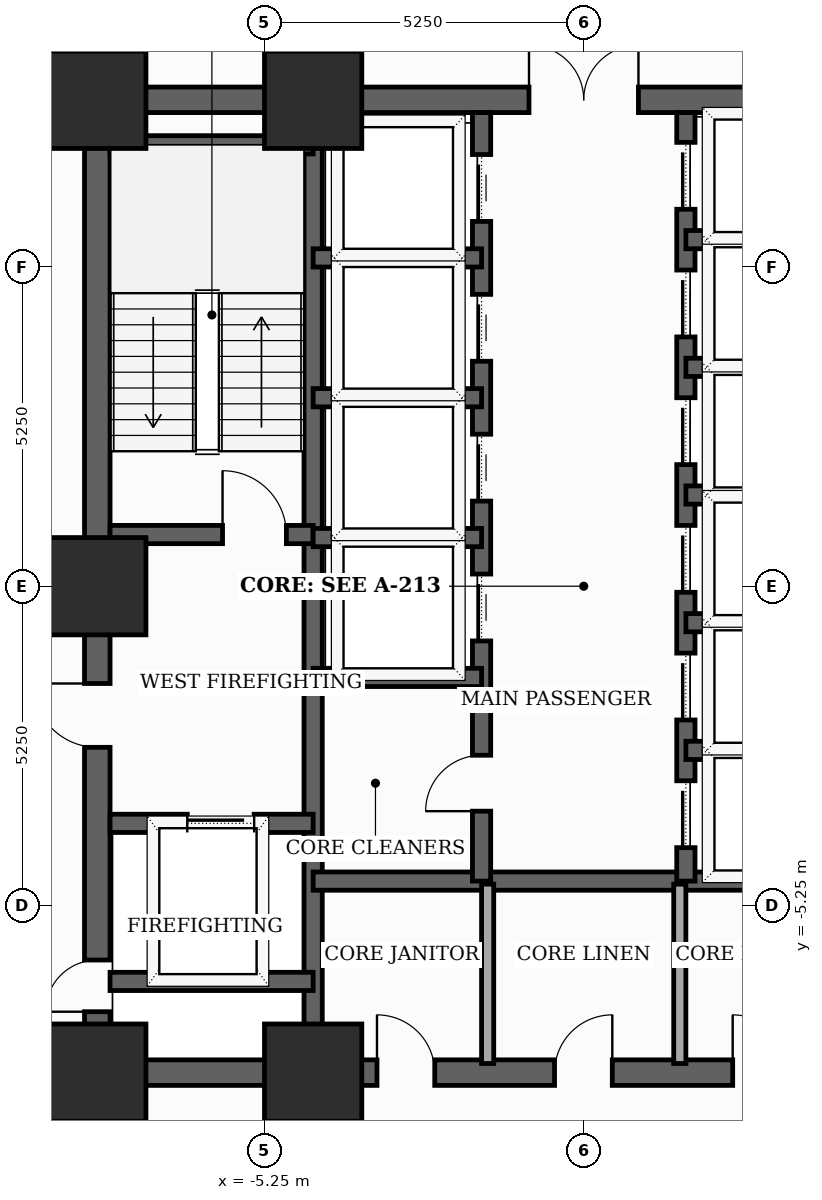
"""IFC4 building model, lengths in metres.
Left out: names, types, materials, properties, quantities, classifications, styles, units other than length and angle.
Written with IfcOpenShell. Run it as: python <this file> out.ifc"""

import sys

from ifc_helpers import new_model, si_unit, direction, frame, frame_2d, origin, origin_2d, place, context, subcontext, project, spatial, rectangle, extrude, element, fill, save


model = new_model("IFC4")
c1 = context("Model", 3, precision=1e-05, world=origin(), true_north=direction((0.0, 1.0)))
c2 = subcontext(c1, "Body", "Model", "MODEL_VIEW")
j1 = project(units=[si_unit("LENGTHUNIT", "METRE"), si_unit("PLANEANGLEUNIT", "RADIAN")], contexts=[c1])
p1 = place(None, origin())
s1 = spatial("IfcSite", under=j1, at=p1, CompositionType="ELEMENT")
p2 = place(p1, origin())
s2 = spatial("IfcBuilding", under=s1, at=p2, CompositionType="ELEMENT")
p3 = place(p2, frame((0.0, 0.0, 44.5)))
s3 = spatial("IfcBuildingStorey", under=s2, at=p3, CompositionType="ELEMENT", Elevation=44.5)
for number, where, z_axis, x_axis in (
    (1, (-8.0, -8.0, 0.0), (0.0, 0.0, 1.0), (1.0, 0.0, 0.0)),
    (2, (-4.45, -8.0, 0.0), (0.0, 0.0, 1.0), (1.0, 0.0, 0.0)),
    (3, (-4.45, 8.0, 0.0), (0.0, 0.0, 1.0), (1.0, 0.0, 0.0)),
    (4, (-8.0, 8.0, 0.0), (0.0, 0.0, 1.0), (1.0, 0.0, 0.0)),
    (5, (-8.0, 0.0, 0.0), (0.0, 0.0, 1.0), (1.0, 0.0, 0.0)),
):
    element("IfcColumn", number, at=place(p3, frame(where, z_axis=z_axis, x_axis=x_axis)), inside=s3, PredefinedType="COLUMN", context=c2, shape_type="SweptSolid", body=[
        extrude(rectangle(XDim=1.6, YDim=1.6, at=origin_2d()), origin(), (0.0, 0.0, 1.0), 3.7),
    ])
p4 = place(p3, frame((-8.0, -8.0, 0.0), z_axis=(0.0, 0.0, 1.0), x_axis=(0.0, 1.0, 0.0)))
e6 = element("IfcWall", 6, at=p4, inside=s3, PredefinedType="SHEAR", context=c2, shape_type="SweptSolid", body=[
    extrude(rectangle(XDim=16.0, YDim=0.42, at=frame_2d((8.0, 0.0))), origin(), (0.0, 0.0, 1.0), 3.5),
])
p5 = place(p4, frame((1.002, 0.0, 0.0)))
e7 = element("IfcOpeningElement", 7, at=p5, cuts=e6, PredefinedType="OPENING", context=c2, shape_type="SweptSolid", body=[
    extrude(rectangle(XDim=0.85, YDim=2.02, at=frame_2d((0.425, 1.01))), frame((0.0, 0.22, 0.0), z_axis=(0.0, -1.0, 0.0), x_axis=(1.0, 0.0, 0.0)), (0.0, 0.0, 1.0), 0.44),
])
p6 = place(p4, frame((5.35, 0.0, 0.0)))
e8 = element("IfcOpeningElement", 8, at=p6, cuts=e6, PredefinedType="OPENING", context=c2, shape_type="SweptSolid", body=[
    extrude(rectangle(XDim=1.05, YDim=2.15, at=frame_2d((0.525, 1.075))), frame((0.0, 0.22, 0.0), z_axis=(0.0, -1.0, 0.0), x_axis=(1.0, 0.0, 0.0)), (0.0, 0.0, 1.0), 0.44),
])
p7 = place(p3, frame((-8.0, -8.0, 0.0), z_axis=(0.0, 0.0, 1.0), x_axis=(1.0, 0.0, 0.0)))
e9 = element("IfcWall", 9, at=p7, inside=s3, PredefinedType="SHEAR", context=c2, shape_type="SweptSolid", body=[
    extrude(rectangle(XDim=16.0, YDim=0.42, at=frame_2d((8.0, 0.0))), origin(), (0.0, 0.0, 1.0), 3.5),
])
p8 = place(p7, frame((4.6, 0.0, 0.0)))
e10 = element("IfcOpeningElement", 10, at=p8, cuts=e9, PredefinedType="OPENING", context=c2, shape_type="SweptSolid", body=[
    extrude(rectangle(XDim=0.95, YDim=2.1, at=frame_2d((0.475, 1.05))), frame((0.0, 0.22, 0.0), z_axis=(0.0, -1.0, 0.0), x_axis=(1.0, 0.0, 0.0)), (0.0, 0.0, 1.0), 0.44),
])
p9 = place(p7, frame((7.52, 0.0, 0.0)))
e11 = element("IfcOpeningElement", 11, at=p9, cuts=e9, PredefinedType="OPENING", context=c2, shape_type="SweptSolid", body=[
    extrude(rectangle(XDim=0.95, YDim=2.1, at=frame_2d((0.475, 1.05))), frame((0.0, 0.22, 0.0), z_axis=(0.0, -1.0, 0.0), x_axis=(1.0, 0.0, 0.0)), (0.0, 0.0, 1.0), 0.44),
])
p10 = place(p7, frame((10.45, 0.0, 0.0)))
e12 = element("IfcOpeningElement", 12, at=p10, cuts=e9, PredefinedType="OPENING", context=c2, shape_type="SweptSolid", body=[
    extrude(rectangle(XDim=0.95, YDim=2.1, at=frame_2d((0.475, 1.05))), frame((0.0, 0.22, 0.0), z_axis=(0.0, -1.0, 0.0), x_axis=(1.0, 0.0, 0.0)), (0.0, 0.0, 1.0), 0.44),
])
p11 = place(p3, frame((-8.0, 8.0, 0.0), z_axis=(0.0, 0.0, 1.0), x_axis=(1.0, 0.0, 0.0)))
e13 = element("IfcWall", 13, at=p11, inside=s3, PredefinedType="SHEAR", context=c2, shape_type="SweptSolid", body=[
    extrude(rectangle(XDim=16.0, YDim=0.42, at=frame_2d((8.0, 0.0))), origin(), (0.0, 0.0, 1.0), 3.5),
])
p12 = place(p11, frame((7.1, 0.0, 0.0)))
e14 = element("IfcOpeningElement", 14, at=p12, cuts=e13, PredefinedType="OPENING", context=c2, shape_type="SweptSolid", body=[
    extrude(rectangle(XDim=1.8, YDim=2.15, at=frame_2d((0.9, 1.075))), frame((0.0, 0.22, 0.0), z_axis=(0.0, -1.0, 0.0), x_axis=(1.0, 0.0, 0.0)), (0.0, 0.0, 1.0), 0.44),
])
p13 = place(p3, frame((-4.45, -7.79, 0.0), z_axis=(0.0, 0.0, 1.0), x_axis=(0.0, 1.0, 0.0)))
e15 = element("IfcWall", 15, at=p13, inside=s3, PredefinedType="SHEAR", context=c2, shape_type="SweptSolid", body=[
    extrude(rectangle(XDim=15.58, YDim=0.3, at=frame_2d((7.79, 0.0))), origin(), (0.0, 0.0, 1.0), 3.5),
])
p14 = place(p3, frame((-7.79, 0.85, 0.0), z_axis=(0.0, 0.0, 1.0), x_axis=(1.0, 0.0, 0.0)))
e16 = element("IfcWall", 16, at=p14, inside=s3, PredefinedType="SHEAR", context=c2, shape_type="SweptSolid", body=[
    extrude(rectangle(XDim=3.34, YDim=0.3, at=frame_2d((1.67, 0.0))), origin(), (0.0, 0.0, 1.0), 3.5),
])
p15 = place(p14, frame((1.85, 0.0, 0.0)))
e17 = element("IfcOpeningElement", 17, at=p15, cuts=e16, PredefinedType="OPENING", context=c2, shape_type="SweptSolid", body=[
    extrude(rectangle(XDim=1.05, YDim=2.15, at=frame_2d((0.525, 1.075))), frame((0.0, 0.16, 0.0), z_axis=(0.0, -1.0, 0.0), x_axis=(1.0, 0.0, 0.0)), (0.0, 0.0, 1.0), 0.32),
])
p16 = place(p3, frame((-7.79, 7.26, 0.0), z_axis=(0.0, 0.0, 1.0), x_axis=(1.0, 0.0, 0.0)))
e18 = element("IfcWall", 18, at=p16, inside=s3, PredefinedType="SHEAR", context=c2, shape_type="SweptSolid", body=[
    extrude(rectangle(XDim=3.34, YDim=0.3, at=frame_2d((1.67, 0.0))), origin(), (0.0, 0.0, 1.0), 3.5),
])
p17 = place(p3, frame((-7.79, -3.9, 0.0), z_axis=(0.0, 0.0, 1.0), x_axis=(1.0, 0.0, 0.0)))
e19 = element("IfcWall", 19, at=p17, inside=s3, PredefinedType="SHEAR", context=c2, shape_type="SweptSolid", body=[
    extrude(rectangle(XDim=3.34, YDim=0.3, at=frame_2d((1.67, 0.0))), origin(), (0.0, 0.0, 1.0), 3.5),
])
p18 = place(p17, frame((1.27, 0.0, 0.0)))
e20 = element("IfcOpeningElement", 20, at=p18, cuts=e19, PredefinedType="OPENING", context=c2, shape_type="SweptSolid", body=[
    extrude(rectangle(XDim=1.1, YDim=2.1, at=frame_2d((0.55, 1.05))), frame((0.0, 0.16, 0.0), z_axis=(0.0, -1.0, 0.0), x_axis=(1.0, 0.0, 0.0)), (0.0, 0.0, 1.0), 0.32),
])
p19 = place(p3, frame((-7.79, -6.5, 0.0), z_axis=(0.0, 0.0, 1.0), x_axis=(1.0, 0.0, 0.0)))
e21 = element("IfcWall", 21, at=p19, inside=s3, PredefinedType="SHEAR", context=c2, shape_type="SweptSolid", body=[
    extrude(rectangle(XDim=3.34, YDim=0.3, at=frame_2d((1.67, 0.0))), origin(), (0.0, 0.0, 1.0), 3.5),
])
p20 = place(p3, frame((-4.45, -4.85, 0.0), z_axis=(0.0, 0.0, 1.0), x_axis=(1.0, 0.0, 0.0)))
e22 = element("IfcWall", 22, at=p20, inside=s3, PredefinedType="SHEAR", context=c2, shape_type="SweptSolid", body=[
    extrude(rectangle(XDim=8.9, YDim=0.3, at=frame_2d((4.45, 0.0))), origin(), (0.0, 0.0, 1.0), 3.5),
])
p21 = place(p3, frame((-1.68, -4.85, 0.0), z_axis=(0.0, 0.0, 1.0), x_axis=(0.0, 1.0, 0.0)))
e23 = element("IfcWall", 23, at=p21, inside=s3, PredefinedType="SHEAR", context=c2, shape_type="SweptSolid", body=[
    extrude(rectangle(XDim=12.64, YDim=0.3, at=frame_2d((6.32, 0.0))), origin(), (0.0, 0.0, 1.0), 3.5),
])
p22 = place(p21, frame((3.95, 0.0, 0.0)))
e24 = element("IfcOpeningElement", 24, at=p22, cuts=e23, PredefinedType="OPENING", context=c2, shape_type="SweptSolid", body=[
    extrude(rectangle(XDim=1.1, YDim=2.1, at=frame_2d((0.55, 1.05))), frame((0.0, 0.16, 0.0), z_axis=(0.0, -1.0, 0.0), x_axis=(1.0, 0.0, 0.0)), (0.0, 0.0, 1.0), 0.32),
])
p23 = place(p21, frame((6.25, 0.0, 0.0)))
e25 = element("IfcOpeningElement", 25, at=p23, cuts=e23, PredefinedType="OPENING", context=c2, shape_type="SweptSolid", body=[
    extrude(rectangle(XDim=1.1, YDim=2.1, at=frame_2d((0.55, 1.05))), frame((0.0, 0.16, 0.0), z_axis=(0.0, -1.0, 0.0), x_axis=(1.0, 0.0, 0.0)), (0.0, 0.0, 1.0), 0.32),
])
p24 = place(p21, frame((8.55, 0.0, 0.0)))
e26 = element("IfcOpeningElement", 26, at=p24, cuts=e23, PredefinedType="OPENING", context=c2, shape_type="SweptSolid", body=[
    extrude(rectangle(XDim=1.1, YDim=2.1, at=frame_2d((0.55, 1.05))), frame((0.0, 0.16, 0.0), z_axis=(0.0, -1.0, 0.0), x_axis=(1.0, 0.0, 0.0)), (0.0, 0.0, 1.0), 0.32),
])
p25 = place(p21, frame((10.85, 0.0, 0.0)))
e27 = element("IfcOpeningElement", 27, at=p25, cuts=e23, PredefinedType="OPENING", context=c2, shape_type="SweptSolid", body=[
    extrude(rectangle(XDim=1.1, YDim=2.1, at=frame_2d((0.55, 1.05))), frame((0.0, 0.16, 0.0), z_axis=(0.0, -1.0, 0.0), x_axis=(1.0, 0.0, 0.0)), (0.0, 0.0, 1.0), 0.32),
])
p26 = place(p21, frame((1.15, 0.0, 0.0)))
e28 = element("IfcOpeningElement", 28, at=p26, cuts=e23, PredefinedType="OPENING", context=c2, shape_type="SweptSolid", body=[
    extrude(rectangle(XDim=0.92, YDim=2.1, at=frame_2d((0.46, 1.05))), frame((0.0, 0.16, 0.0), z_axis=(0.0, -1.0, 0.0), x_axis=(1.0, 0.0, 0.0)), (0.0, 0.0, 1.0), 0.32),
])
p27 = place(p3, frame((1.68, -4.85, 0.0), z_axis=(0.0, 0.0, 1.0), x_axis=(0.0, 1.0, 0.0)))
e29 = element("IfcWall", 29, at=p27, inside=s3, PredefinedType="SHEAR", context=c2, shape_type="SweptSolid", body=[
    extrude(rectangle(XDim=12.64, YDim=0.3, at=frame_2d((6.32, 0.0))), origin(), (0.0, 0.0, 1.0), 3.5),
])
p28 = place(p27, frame((0.55, 0.0, 0.0)))
e30 = element("IfcOpeningElement", 30, at=p28, cuts=e29, PredefinedType="OPENING", context=c2, shape_type="SweptSolid", body=[
    extrude(rectangle(XDim=1.1, YDim=2.1, at=frame_2d((0.55, 1.05))), frame((0.0, 0.16, 0.0), z_axis=(0.0, -1.0, 0.0), x_axis=(1.0, 0.0, 0.0)), (0.0, 0.0, 1.0), 0.32),
])
p29 = place(p27, frame((2.65, 0.0, 0.0)))
e31 = element("IfcOpeningElement", 31, at=p29, cuts=e29, PredefinedType="OPENING", context=c2, shape_type="SweptSolid", body=[
    extrude(rectangle(XDim=1.1, YDim=2.1, at=frame_2d((0.55, 1.05))), frame((0.0, 0.16, 0.0), z_axis=(0.0, -1.0, 0.0), x_axis=(1.0, 0.0, 0.0)), (0.0, 0.0, 1.0), 0.32),
])
p30 = place(p27, frame((4.75, 0.0, 0.0)))
e32 = element("IfcOpeningElement", 32, at=p30, cuts=e29, PredefinedType="OPENING", context=c2, shape_type="SweptSolid", body=[
    extrude(rectangle(XDim=1.1, YDim=2.1, at=frame_2d((0.55, 1.05))), frame((0.0, 0.16, 0.0), z_axis=(0.0, -1.0, 0.0), x_axis=(1.0, 0.0, 0.0)), (0.0, 0.0, 1.0), 0.32),
])
p31 = place(p27, frame((6.85, 0.0, 0.0)))
e33 = element("IfcOpeningElement", 33, at=p31, cuts=e29, PredefinedType="OPENING", context=c2, shape_type="SweptSolid", body=[
    extrude(rectangle(XDim=1.1, YDim=2.1, at=frame_2d((0.55, 1.05))), frame((0.0, 0.16, 0.0), z_axis=(0.0, -1.0, 0.0), x_axis=(1.0, 0.0, 0.0)), (0.0, 0.0, 1.0), 0.32),
])
p32 = place(p27, frame((8.95, 0.0, 0.0)))
e34 = element("IfcOpeningElement", 34, at=p32, cuts=e29, PredefinedType="OPENING", context=c2, shape_type="SweptSolid", body=[
    extrude(rectangle(XDim=1.1, YDim=2.1, at=frame_2d((0.55, 1.05))), frame((0.0, 0.16, 0.0), z_axis=(0.0, -1.0, 0.0), x_axis=(1.0, 0.0, 0.0)), (0.0, 0.0, 1.0), 0.32),
])
p33 = place(p27, frame((11.05, 0.0, 0.0)))
e35 = element("IfcOpeningElement", 35, at=p33, cuts=e29, PredefinedType="OPENING", context=c2, shape_type="SweptSolid", body=[
    extrude(rectangle(XDim=1.1, YDim=2.1, at=frame_2d((0.55, 1.05))), frame((0.0, 0.16, 0.0), z_axis=(0.0, -1.0, 0.0), x_axis=(1.0, 0.0, 0.0)), (0.0, 0.0, 1.0), 0.32),
])
for number, where, z_axis, x_axis in (
    (36, (-4.45, -1.5, 0.0), (0.0, 0.0, 1.0), (1.0, 0.0, 0.0)),
    (37, (-4.45, 0.8, 0.0), (0.0, 0.0, 1.0), (1.0, 0.0, 0.0)),
    (38, (-4.45, 3.1, 0.0), (0.0, 0.0, 1.0), (1.0, 0.0, 0.0)),
    (39, (-4.45, 5.4, 0.0), (0.0, 0.0, 1.0), (1.0, 0.0, 0.0)),
    (40, (1.68, 1.5, 0.0), (0.0, 0.0, 1.0), (1.0, 0.0, 0.0)),
    (41, (1.68, 3.6, 0.0), (0.0, 0.0, 1.0), (1.0, 0.0, 0.0)),
    (42, (1.68, 5.7, 0.0), (0.0, 0.0, 1.0), (1.0, 0.0, 0.0)),
    (43, (1.68, -2.7, 0.0), (0.0, 0.0, 1.0), (1.0, 0.0, 0.0)),
    (44, (1.68, -0.6, 0.0), (0.0, 0.0, 1.0), (1.0, 0.0, 0.0)),
):
    element("IfcWall", number, at=place(p3, frame(where, z_axis=z_axis, x_axis=x_axis)), inside=s3, PredefinedType="SHEAR", context=c2, shape_type="SweptSolid", body=[
        extrude(rectangle(XDim=2.77, YDim=0.3, at=frame_2d((1.385, 0.0))), origin(), (0.0, 0.0, 1.0), 3.5),
    ])
for number, where, z_axis, x_axis in (
    (45, (-1.58, -7.85, 0.0), (0.0, 0.0, 1.0), (0.0, 1.0, 0.0)),
    (46, (1.58, -7.85, 0.0), (0.0, 0.0, 1.0), (0.0, 1.0, 0.0)),
):
    element("IfcWall", number, at=place(p3, frame(where, z_axis=z_axis, x_axis=x_axis)), inside=s3, PredefinedType="SOLIDWALL", context=c2, shape_type="SweptSolid", body=[
        extrude(rectangle(XDim=2.95, YDim=0.2, at=frame_2d((1.475, 0.0))), origin(), (0.0, 0.0, 1.0), 2.885),
    ])
p34 = place(p5, origin())
e47 = element("IfcDoor", 47, at=p34, inside=s3, OperationType="SINGLE_SWING_LEFT", PredefinedType="TRAPDOOR", context=c2, shape_type="SweptSolid", body=[
    extrude(rectangle(XDim=0.85, YDim=2.02, at=frame_2d((0.425, 1.01))), frame((0.0, 0.025, 0.0), z_axis=(0.0, -1.0, 0.0), x_axis=(1.0, 0.0, 0.0)), (0.0, 0.0, 1.0), 0.05),
])
fill(e7, e47)
p35 = place(p6, origin())
e48 = element("IfcDoor", 48, at=p35, inside=s3, OperationType="SINGLE_SWING_RIGHT", PredefinedType="DOOR", context=c2, shape_type="SweptSolid", body=[
    extrude(rectangle(XDim=1.05, YDim=2.15, at=frame_2d((0.525, 1.075))), frame((0.0, 0.025, 0.0), z_axis=(0.0, -1.0, 0.0), x_axis=(1.0, 0.0, 0.0)), (0.0, 0.0, 1.0), 0.05),
])
fill(e8, e48)
p36 = place(p8, origin())
e49 = element("IfcDoor", 49, at=p36, inside=s3, OperationType="SINGLE_SWING_LEFT", PredefinedType="DOOR", context=c2, shape_type="SweptSolid", body=[
    extrude(rectangle(XDim=0.95, YDim=2.1, at=frame_2d((0.475, 1.05))), frame((0.0, 0.025, 0.0), z_axis=(0.0, -1.0, 0.0), x_axis=(1.0, 0.0, 0.0)), (0.0, 0.0, 1.0), 0.05),
])
fill(e10, e49)
p37 = place(p9, origin())
e50 = element("IfcDoor", 50, at=p37, inside=s3, OperationType="SINGLE_SWING_RIGHT", PredefinedType="DOOR", context=c2, shape_type="SweptSolid", body=[
    extrude(rectangle(XDim=0.95, YDim=2.1, at=frame_2d((0.475, 1.05))), frame((0.0, 0.025, 0.0), z_axis=(0.0, -1.0, 0.0), x_axis=(1.0, 0.0, 0.0)), (0.0, 0.0, 1.0), 0.05),
])
fill(e11, e50)
p38 = place(p10, origin())
e51 = element("IfcDoor", 51, at=p38, inside=s3, OperationType="SINGLE_SWING_LEFT", PredefinedType="DOOR", context=c2, shape_type="SweptSolid", body=[
    extrude(rectangle(XDim=0.95, YDim=2.1, at=frame_2d((0.475, 1.05))), frame((0.0, 0.025, 0.0), z_axis=(0.0, -1.0, 0.0), x_axis=(1.0, 0.0, 0.0)), (0.0, 0.0, 1.0), 0.05),
])
fill(e12, e51)
p39 = place(p12, origin())
e52 = element("IfcDoor", 52, at=p39, inside=s3, OperationType="DOUBLE_DOOR_SINGLE_SWING", PredefinedType="DOOR", context=c2, shape_type="SweptSolid", body=[
    extrude(rectangle(XDim=1.8, YDim=2.15, at=frame_2d((0.9, 1.075))), frame((0.0, 0.025, 0.0), z_axis=(0.0, -1.0, 0.0), x_axis=(1.0, 0.0, 0.0)), (0.0, 0.0, 1.0), 0.05),
])
fill(e14, e52)
p40 = place(p15, origin())
e53 = element("IfcDoor", 53, at=p40, inside=s3, OperationType="SINGLE_SWING_LEFT", PredefinedType="DOOR", context=c2, shape_type="SweptSolid", body=[
    extrude(rectangle(XDim=1.05, YDim=2.15, at=frame_2d((0.525, 1.075))), frame((0.0, 0.025, 0.0), z_axis=(0.0, -1.0, 0.0), x_axis=(1.0, 0.0, 0.0)), (0.0, 0.0, 1.0), 0.05),
])
fill(e17, e53)
p41 = place(p18, origin())
e54 = element("IfcDoor", 54, at=p41, inside=s3, OperationType="SLIDING_TO_LEFT", PredefinedType="DOOR", context=c2, shape_type="SweptSolid", body=[
    extrude(rectangle(XDim=1.1, YDim=2.1, at=frame_2d((0.55, 1.05))), frame((0.0, 0.025, 0.0), z_axis=(0.0, -1.0, 0.0), x_axis=(1.0, 0.0, 0.0)), (0.0, 0.0, 1.0), 0.05),
])
fill(e20, e54)
p42 = place(p22, origin())
e55 = element("IfcDoor", 55, at=p42, inside=s3, OperationType="SLIDING_TO_LEFT", PredefinedType="DOOR", context=c2, shape_type="SweptSolid", body=[
    extrude(rectangle(XDim=1.1, YDim=2.1, at=frame_2d((0.55, 1.05))), frame((0.0, 0.025, 0.0), z_axis=(0.0, -1.0, 0.0), x_axis=(1.0, 0.0, 0.0)), (0.0, 0.0, 1.0), 0.05),
])
fill(e24, e55)
p43 = place(p23, origin())
e56 = element("IfcDoor", 56, at=p43, inside=s3, OperationType="SLIDING_TO_LEFT", PredefinedType="DOOR", context=c2, shape_type="SweptSolid", body=[
    extrude(rectangle(XDim=1.1, YDim=2.1, at=frame_2d((0.55, 1.05))), frame((0.0, 0.025, 0.0), z_axis=(0.0, -1.0, 0.0), x_axis=(1.0, 0.0, 0.0)), (0.0, 0.0, 1.0), 0.05),
])
fill(e25, e56)
p44 = place(p24, origin())
e57 = element("IfcDoor", 57, at=p44, inside=s3, OperationType="SLIDING_TO_LEFT", PredefinedType="DOOR", context=c2, shape_type="SweptSolid", body=[
    extrude(rectangle(XDim=1.1, YDim=2.1, at=frame_2d((0.55, 1.05))), frame((0.0, 0.025, 0.0), z_axis=(0.0, -1.0, 0.0), x_axis=(1.0, 0.0, 0.0)), (0.0, 0.0, 1.0), 0.05),
])
fill(e26, e57)
p45 = place(p25, origin())
e58 = element("IfcDoor", 58, at=p45, inside=s3, OperationType="SLIDING_TO_LEFT", PredefinedType="DOOR", context=c2, shape_type="SweptSolid", body=[
    extrude(rectangle(XDim=1.1, YDim=2.1, at=frame_2d((0.55, 1.05))), frame((0.0, 0.025, 0.0), z_axis=(0.0, -1.0, 0.0), x_axis=(1.0, 0.0, 0.0)), (0.0, 0.0, 1.0), 0.05),
])
fill(e27, e58)
p46 = place(p26, origin())
e59 = element("IfcDoor", 59, at=p46, inside=s3, OperationType="SINGLE_SWING_LEFT", PredefinedType="DOOR", context=c2, shape_type="SweptSolid", body=[
    extrude(rectangle(XDim=0.92, YDim=2.1, at=frame_2d((0.46, 1.05))), frame((0.0, 0.025, 0.0), z_axis=(0.0, -1.0, 0.0), x_axis=(1.0, 0.0, 0.0)), (0.0, 0.0, 1.0), 0.05),
])
fill(e28, e59)
p47 = place(p28, origin())
e60 = element("IfcDoor", 60, at=p47, inside=s3, OperationType="SLIDING_TO_LEFT", PredefinedType="DOOR", context=c2, shape_type="SweptSolid", body=[
    extrude(rectangle(XDim=1.1, YDim=2.1, at=frame_2d((0.55, 1.05))), frame((0.0, 0.025, 0.0), z_axis=(0.0, -1.0, 0.0), x_axis=(1.0, 0.0, 0.0)), (0.0, 0.0, 1.0), 0.05),
])
fill(e30, e60)
p48 = place(p29, origin())
e61 = element("IfcDoor", 61, at=p48, inside=s3, OperationType="SLIDING_TO_LEFT", PredefinedType="DOOR", context=c2, shape_type="SweptSolid", body=[
    extrude(rectangle(XDim=1.1, YDim=2.1, at=frame_2d((0.55, 1.05))), frame((0.0, 0.025, 0.0), z_axis=(0.0, -1.0, 0.0), x_axis=(1.0, 0.0, 0.0)), (0.0, 0.0, 1.0), 0.05),
])
fill(e31, e61)
p49 = place(p30, origin())
e62 = element("IfcDoor", 62, at=p49, inside=s3, OperationType="SLIDING_TO_LEFT", PredefinedType="DOOR", context=c2, shape_type="SweptSolid", body=[
    extrude(rectangle(XDim=1.1, YDim=2.1, at=frame_2d((0.55, 1.05))), frame((0.0, 0.025, 0.0), z_axis=(0.0, -1.0, 0.0), x_axis=(1.0, 0.0, 0.0)), (0.0, 0.0, 1.0), 0.05),
])
fill(e32, e62)
p50 = place(p31, origin())
e63 = element("IfcDoor", 63, at=p50, inside=s3, OperationType="SLIDING_TO_LEFT", PredefinedType="DOOR", context=c2, shape_type="SweptSolid", body=[
    extrude(rectangle(XDim=1.1, YDim=2.1, at=frame_2d((0.55, 1.05))), frame((0.0, 0.025, 0.0), z_axis=(0.0, -1.0, 0.0), x_axis=(1.0, 0.0, 0.0)), (0.0, 0.0, 1.0), 0.05),
])
fill(e33, e63)
p51 = place(p32, origin())
e64 = element("IfcDoor", 64, at=p51, inside=s3, OperationType="SLIDING_TO_LEFT", PredefinedType="DOOR", context=c2, shape_type="SweptSolid", body=[
    extrude(rectangle(XDim=1.1, YDim=2.1, at=frame_2d((0.55, 1.05))), frame((0.0, 0.025, 0.0), z_axis=(0.0, -1.0, 0.0), x_axis=(1.0, 0.0, 0.0)), (0.0, 0.0, 1.0), 0.05),
])
fill(e34, e64)
p52 = place(p33, origin())
e65 = element("IfcDoor", 65, at=p52, inside=s3, OperationType="SLIDING_TO_LEFT", PredefinedType="DOOR", context=c2, shape_type="SweptSolid", body=[
    extrude(rectangle(XDim=1.1, YDim=2.1, at=frame_2d((0.55, 1.05))), frame((0.0, 0.025, 0.0), z_axis=(0.0, -1.0, 0.0), x_axis=(1.0, 0.0, 0.0)), (0.0, 0.0, 1.0), 0.05),
])
fill(e35, e65)
save(model, sys.argv[1])
